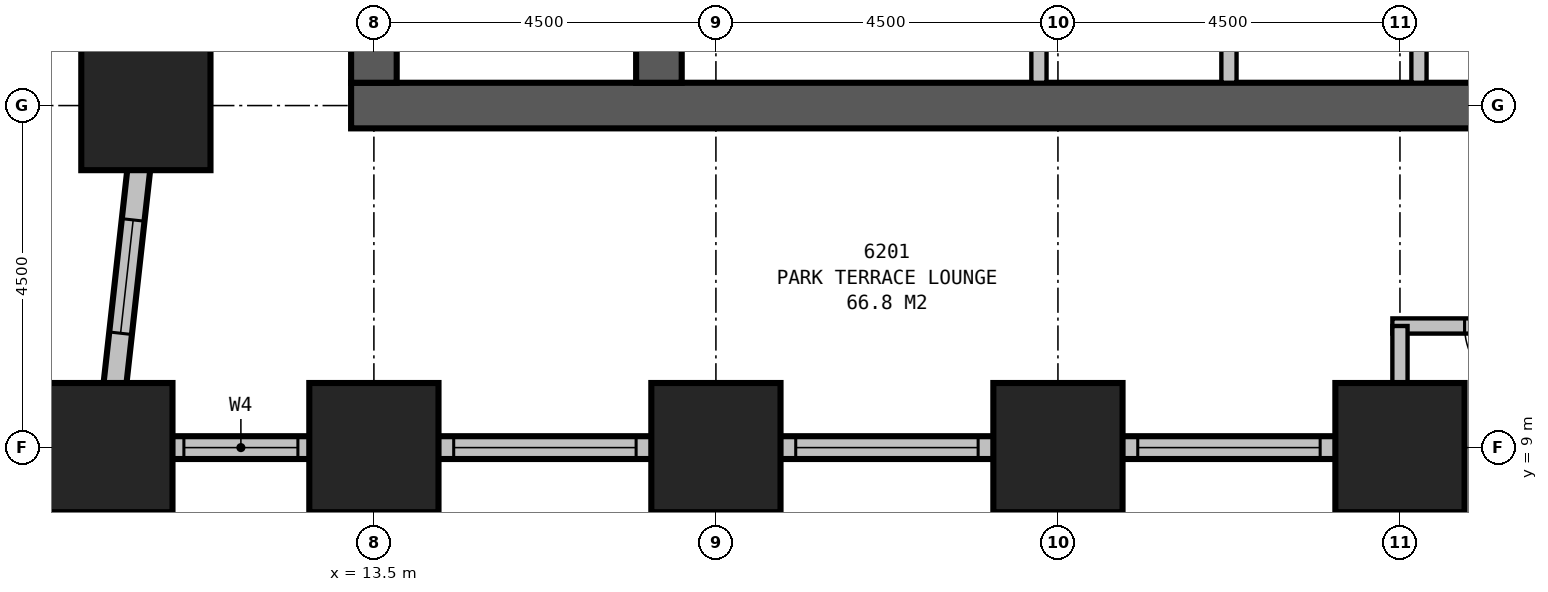
"""IFC4 building model, lengths in metres.
Left out: names, types, materials, properties, quantities, classifications, styles, units other than length and angle.
Written with IfcOpenShell. Run it as: python <this file> out.ifc"""

import sys

from ifc_helpers import new_model, si_unit, direction, frame, frame_2d, origin, origin_2d, place, context, subcontext, project, spatial, rectangle, extrude, element, fill, save


model = new_model("IFC4")
c1 = context("Model", 3, precision=1e-05, world=origin(), true_north=direction((0.0, 1.0)))
c2 = subcontext(c1, "Body", "Model", "MODEL_VIEW")
j1 = project(units=[si_unit("LENGTHUNIT", "METRE"), si_unit("PLANEANGLEUNIT", "RADIAN")], contexts=[c1])
p1 = place(None, origin())
s1 = spatial("IfcSite", under=j1, at=p1, CompositionType="ELEMENT")
p2 = place(p1, origin())
s2 = spatial("IfcBuilding", under=s1, at=p2, CompositionType="ELEMENT")
p3 = place(p2, frame((0.0, 0.0, 240.8)))
s3 = spatial("IfcBuildingStorey", under=s2, at=p3, CompositionType="ELEMENT", Elevation=240.8)
for number, where, z_axis, x_axis in (
    (1, (10.0, 9.0, 0.0), (0.0, 0.0, 1.0), (1.0, 0.0, 0.0)),
    (2, (13.5, 9.0, 0.0), (0.0, 0.0, 1.0), (1.0, 0.0, 0.0)),
    (3, (18.0, 9.0, 0.0), (0.0, 0.0, 1.0), (1.0, 0.0, 0.0)),
    (4, (22.5, 9.0, 0.0), (0.0, 0.0, 1.0), (1.0, 0.0, 0.0)),
    (5, (27.0, 9.0, 0.0), (0.0, 0.0, 1.0), (1.0, 0.0, 0.0)),
    (6, (10.5, 13.5, 0.0), (0.0, 0.0, 1.0), (1.0, 0.0, 0.0)),
):
    element("IfcColumn", number, at=place(p3, frame(where, z_axis=z_axis, x_axis=x_axis)), inside=s3, PredefinedType="COLUMN", context=c2, shape_type="SweptSolid", body=[
        extrude(rectangle(XDim=1.7, YDim=1.7, at=origin_2d()), origin(), (0.0, 0.0, 1.0), 3.9),
    ])
p4 = place(p3, frame((13.2, 13.5, 0.0), z_axis=(0.0, 0.0, 1.0), x_axis=(1.0, 0.0, 0.0)))
e7 = element("IfcWall", 7, at=p4, inside=s3, PredefinedType="SHEAR", context=c2, shape_type="SweptSolid", body=[
    extrude(rectangle(XDim=23.1, YDim=0.6, at=frame_2d((11.55, 0.0))), origin(), (0.0, 0.0, 1.0), 3.9),
])
p5 = place(p3, frame((17.25, 13.8, 0.0), z_axis=(0.0, 0.0, 1.0), x_axis=(0.0, 1.0, 0.0)))
e8 = element("IfcWall", 8, at=p5, inside=s3, PredefinedType="SHEAR", context=c2, shape_type="SweptSolid", body=[
    extrude(rectangle(XDim=12.9, YDim=0.6, at=frame_2d((6.45, 0.0))), origin(), (0.0, 0.0, 1.0), 3.9),
])
p6 = place(p5, frame((3.85, 0.0, 0.0)))
e9 = element("IfcOpeningElement", 9, at=p6, cuts=e8, PredefinedType="OPENING", context=c2, shape_type="SweptSolid", body=[
    extrude(rectangle(XDim=1.2, YDim=2.1, at=frame_2d((0.6, 1.05))), frame((0.0, 0.31, 0.0), z_axis=(0.0, -1.0, 0.0), x_axis=(1.0, 0.0, 0.0)), (0.0, 0.0, 1.0), 0.62),
])
p7 = place(p3, frame((13.5, 16.5, 0.0), z_axis=(0.0, 0.0, 1.0), x_axis=(0.0, -1.0, 0.0)))
e10 = element("IfcWall", 10, at=p7, inside=s3, PredefinedType="SHEAR", context=c2, shape_type="SweptSolid", body=[
    extrude(rectangle(XDim=2.7, YDim=0.6, at=frame_2d((1.35, 0.0))), origin(), (0.0, 0.0, 1.0), 3.9),
])
p8 = place(p3, frame((9.85, 9.0, 0.0), z_axis=(0.0, 0.0, 1.0), x_axis=(1.0, 0.0, 0.0)))
e11 = element("IfcWall", 11, at=p8, inside=s3, PredefinedType="STANDARD", context=c2, shape_type="SweptSolid", body=[
    extrude(rectangle(XDim=17.3, YDim=0.3, at=frame_2d((8.65, 0.0))), origin(), (0.0, 0.0, 1.0), 2.45),
])
p9 = place(p8, frame((1.15, 0.0, 0.5)))
e12 = element("IfcOpeningElement", 12, at=p9, cuts=e11, PredefinedType="OPENING", context=c2, shape_type="SweptSolid", body=[
    extrude(rectangle(XDim=1.5, YDim=1.75, at=frame_2d((0.75, 0.875))), frame((0.0, 0.16, 0.0), z_axis=(0.0, -1.0, 0.0), x_axis=(1.0, 0.0, 0.0)), (0.0, 0.0, 1.0), 0.32),
])
p10 = place(p8, frame((4.7, 0.0, 0.5)))
e13 = element("IfcOpeningElement", 13, at=p10, cuts=e11, PredefinedType="OPENING", context=c2, shape_type="SweptSolid", body=[
    extrude(rectangle(XDim=2.4, YDim=1.75, at=frame_2d((1.2, 0.875))), frame((0.0, 0.16, 0.0), z_axis=(0.0, -1.0, 0.0), x_axis=(1.0, 0.0, 0.0)), (0.0, 0.0, 1.0), 0.32),
])
p11 = place(p8, frame((9.2, 0.0, 0.5)))
e14 = element("IfcOpeningElement", 14, at=p11, cuts=e11, PredefinedType="OPENING", context=c2, shape_type="SweptSolid", body=[
    extrude(rectangle(XDim=2.4, YDim=1.75, at=frame_2d((1.2, 0.875))), frame((0.0, 0.16, 0.0), z_axis=(0.0, -1.0, 0.0), x_axis=(1.0, 0.0, 0.0)), (0.0, 0.0, 1.0), 0.32),
])
p12 = place(p8, frame((13.7, 0.0, 0.5)))
e15 = element("IfcOpeningElement", 15, at=p12, cuts=e11, PredefinedType="OPENING", context=c2, shape_type="SweptSolid", body=[
    extrude(rectangle(XDim=2.4, YDim=1.75, at=frame_2d((1.2, 0.875))), frame((0.0, 0.16, 0.0), z_axis=(0.0, -1.0, 0.0), x_axis=(1.0, 0.0, 0.0)), (0.0, 0.0, 1.0), 0.32),
])
p13 = place(p3, frame((27.0, 9.15, 0.0), z_axis=(0.0, 0.0, 1.0), x_axis=(0.0, -1.0, 0.0)))
e16 = element("IfcWall", 16, at=p13, inside=s3, PredefinedType="STANDARD", context=c2, shape_type="SweptSolid", body=[
    extrude(rectangle(XDim=9.3, YDim=0.3, at=frame_2d((4.65, 0.0))), origin(), (0.0, 0.0, 1.0), 2.45),
])
p14 = place(p13, frame((1.2, 0.0, 0.5)))
e17 = element("IfcOpeningElement", 17, at=p14, cuts=e16, PredefinedType="OPENING", context=c2, shape_type="SweptSolid", body=[
    extrude(rectangle(XDim=2.4, YDim=1.75, at=frame_2d((1.2, 0.875))), frame((0.0, 0.16, 0.0), z_axis=(0.0, -1.0, 0.0), x_axis=(1.0, 0.0, 0.0)), (0.0, 0.0, 1.0), 0.32),
])
p15 = place(p13, frame((5.7, 0.0, 0.5)))
e18 = element("IfcOpeningElement", 18, at=p15, cuts=e16, PredefinedType="OPENING", context=c2, shape_type="SweptSolid", body=[
    extrude(rectangle(XDim=2.4, YDim=1.75, at=frame_2d((1.2, 0.875))), frame((0.0, 0.16, 0.0), z_axis=(0.0, -1.0, 0.0), x_axis=(1.0, 0.0, 0.0)), (0.0, 0.0, 1.0), 0.32),
])
p16 = place(p3, frame((13.517, 40.649, 0.0), z_axis=(0.0, 0.0, 1.0), x_axis=(-0.110433201132, -0.993883548555, 0.0)))
e19 = element("IfcWall", 19, at=p16, inside=s3, PredefinedType="STANDARD", context=c2, shape_type="SweptSolid", body=[
    extrude(rectangle(XDim=31.994, YDim=0.3, at=frame_2d((15.997, 0.0))), origin(), (0.0, 0.0, 1.0), 2.45),
])
p17 = place(p16, frame((1.664, 0.0, 0.5)))
e20 = element("IfcOpeningElement", 20, at=p17, cuts=e19, PredefinedType="OPENING", context=c2, shape_type="SweptSolid", body=[
    extrude(rectangle(XDim=1.5, YDim=1.75, at=frame_2d((0.75, 0.875))), frame((0.0, 0.16, 0.0), z_axis=(0.0, -1.0, 0.0), x_axis=(1.0, 0.0, 0.0)), (0.0, 0.0, 1.0), 0.32),
])
p18 = place(p16, frame((6.192, 0.0, 0.5)))
e21 = element("IfcOpeningElement", 21, at=p18, cuts=e19, PredefinedType="OPENING", context=c2, shape_type="SweptSolid", body=[
    extrude(rectangle(XDim=1.5, YDim=1.75, at=frame_2d((0.75, 0.875))), frame((0.0, 0.16, 0.0), z_axis=(0.0, -1.0, 0.0), x_axis=(1.0, 0.0, 0.0)), (0.0, 0.0, 1.0), 0.32),
])
p19 = place(p16, frame((15.247, 0.0, 0.5)))
e22 = element("IfcOpeningElement", 22, at=p19, cuts=e19, PredefinedType="OPENING", context=c2, shape_type="SweptSolid", body=[
    extrude(rectangle(XDim=1.5, YDim=1.75, at=frame_2d((0.75, 0.875))), frame((0.0, 0.16, 0.0), z_axis=(0.0, -1.0, 0.0), x_axis=(1.0, 0.0, 0.0)), (0.0, 0.0, 1.0), 0.32),
])
p20 = place(p16, frame((19.775, 0.0, 0.5)))
e23 = element("IfcOpeningElement", 23, at=p20, cuts=e19, PredefinedType="OPENING", context=c2, shape_type="SweptSolid", body=[
    extrude(rectangle(XDim=1.5, YDim=1.75, at=frame_2d((0.75, 0.875))), frame((0.0, 0.16, 0.0), z_axis=(0.0, -1.0, 0.0), x_axis=(1.0, 0.0, 0.0)), (0.0, 0.0, 1.0), 0.32),
])
p21 = place(p16, frame((24.302, 0.0, 0.5)))
e24 = element("IfcOpeningElement", 24, at=p21, cuts=e19, PredefinedType="OPENING", context=c2, shape_type="SweptSolid", body=[
    extrude(rectangle(XDim=1.5, YDim=1.75, at=frame_2d((0.75, 0.875))), frame((0.0, 0.16, 0.0), z_axis=(0.0, -1.0, 0.0), x_axis=(1.0, 0.0, 0.0)), (0.0, 0.0, 1.0), 0.32),
])
p22 = place(p16, frame((28.83, 0.0, 0.5)))
e25 = element("IfcOpeningElement", 25, at=p22, cuts=e19, PredefinedType="OPENING", context=c2, shape_type="SweptSolid", body=[
    extrude(rectangle(XDim=1.5, YDim=1.75, at=frame_2d((0.75, 0.875))), frame((0.0, 0.16, 0.0), z_axis=(0.0, -1.0, 0.0), x_axis=(1.0, 0.0, 0.0)), (0.0, 0.0, 1.0), 0.32),
])
p23 = place(p3, frame((26.9, 10.6, 0.0), z_axis=(0.0, 0.0, 1.0), x_axis=(1.0, 0.0, 0.0)))
e26 = element("IfcWall", 26, at=p23, inside=s3, PredefinedType="PARTITIONING", context=c2, shape_type="SweptSolid", body=[
    extrude(rectangle(XDim=11.4, YDim=0.2, at=frame_2d((5.7, 0.0))), origin(), (0.0, 0.0, 1.0), 3.65),
])
p24 = place(p23, frame((1.85, 0.0, 0.0), z_axis=(0.0, 0.0, 1.0), x_axis=(-1.0, 0.0, 0.0)))
e27 = element("IfcOpeningElement", 27, at=p24, cuts=e26, PredefinedType="OPENING", context=c2, shape_type="SweptSolid", body=[
    extrude(rectangle(XDim=0.9, YDim=2.1, at=frame_2d((0.45, 1.05))), frame((0.0, 0.11, 0.0), z_axis=(0.0, -1.0, 0.0), x_axis=(1.0, 0.0, 0.0)), (0.0, 0.0, 1.0), 0.22),
])
p25 = place(p23, frame((10.7, 0.0, 0.0), z_axis=(0.0, 0.0, 1.0), x_axis=(-1.0, 0.0, 0.0)))
e28 = element("IfcOpeningElement", 28, at=p25, cuts=e26, PredefinedType="OPENING", context=c2, shape_type="SweptSolid", body=[
    extrude(rectangle(XDim=0.9, YDim=2.1, at=frame_2d((0.45, 1.05))), frame((0.0, 0.11, 0.0), z_axis=(0.0, -1.0, 0.0), x_axis=(1.0, 0.0, 0.0)), (0.0, 0.0, 1.0), 0.22),
])
p26 = place(p3, frame((27.0, 10.6, 0.0), z_axis=(0.0, 0.0, 1.0), x_axis=(0.0, -1.0, 0.0)))
e29 = element("IfcWall", 29, at=p26, inside=s3, PredefinedType="PARTITIONING", context=c2, shape_type="SweptSolid", body=[
    extrude(rectangle(XDim=1.6, YDim=0.2, at=frame_2d((0.8, 0.0))), origin(), (0.0, 0.0, 1.0), 2.6),
])
for number, where, z_axis, x_axis in (
    (30, (22.25, 13.8, 0.0), (0.0, 0.0, 1.0), (0.0, 1.0, 0.0)),
    (31, (24.75, 13.8, 0.0), (0.0, 0.0, 1.0), (0.0, 1.0, 0.0)),
    (32, (27.25, 13.8, 0.0), (0.0, 0.0, 1.0), (0.0, 1.0, 0.0)),
):
    element("IfcWall", number, at=place(p3, frame(where, z_axis=z_axis, x_axis=x_axis)), inside=s3, PredefinedType="PARTITIONING", context=c2, shape_type="SweptSolid", body=[
        extrude(rectangle(XDim=2.4, YDim=0.2, at=frame_2d((1.2, 0.0))), origin(), (0.0, 0.0, 1.0), 3.65),
    ])
p27 = place(p9, origin())
e33 = element("IfcWindow", 33, at=p27, inside=s3, PartitioningType="SINGLE_PANEL", PredefinedType="WINDOW", context=c2, shape_type="SweptSolid", body=[
    extrude(rectangle(XDim=1.5, YDim=1.75, at=frame_2d((0.75, 0.875))), frame((0.0, 0.03, 0.0), z_axis=(0.0, -1.0, 0.0), x_axis=(1.0, 0.0, 0.0)), (0.0, 0.0, 1.0), 0.06),
])
fill(e12, e33)
p28 = place(p10, origin())
e34 = element("IfcWindow", 34, at=p28, inside=s3, PartitioningType="SINGLE_PANEL", PredefinedType="WINDOW", context=c2, shape_type="SweptSolid", body=[
    extrude(rectangle(XDim=2.4, YDim=1.75, at=frame_2d((1.2, 0.875))), frame((0.0, 0.03, 0.0), z_axis=(0.0, -1.0, 0.0), x_axis=(1.0, 0.0, 0.0)), (0.0, 0.0, 1.0), 0.06),
])
fill(e13, e34)
p29 = place(p11, origin())
e35 = element("IfcWindow", 35, at=p29, inside=s3, PartitioningType="SINGLE_PANEL", PredefinedType="WINDOW", context=c2, shape_type="SweptSolid", body=[
    extrude(rectangle(XDim=2.4, YDim=1.75, at=frame_2d((1.2, 0.875))), frame((0.0, 0.03, 0.0), z_axis=(0.0, -1.0, 0.0), x_axis=(1.0, 0.0, 0.0)), (0.0, 0.0, 1.0), 0.06),
])
fill(e14, e35)
p30 = place(p12, origin())
e36 = element("IfcWindow", 36, at=p30, inside=s3, PartitioningType="SINGLE_PANEL", PredefinedType="WINDOW", context=c2, shape_type="SweptSolid", body=[
    extrude(rectangle(XDim=2.4, YDim=1.75, at=frame_2d((1.2, 0.875))), frame((0.0, 0.03, 0.0), z_axis=(0.0, -1.0, 0.0), x_axis=(1.0, 0.0, 0.0)), (0.0, 0.0, 1.0), 0.06),
])
fill(e15, e36)
p31 = place(p22, origin())
e37 = element("IfcWindow", 37, at=p31, inside=s3, PartitioningType="SINGLE_PANEL", PredefinedType="WINDOW", context=c2, shape_type="SweptSolid", body=[
    extrude(rectangle(XDim=1.5, YDim=1.75, at=frame_2d((0.75, 0.875))), frame((0.0, 0.03, 0.0), z_axis=(0.0, -1.0, 0.0), x_axis=(1.0, 0.0, 0.0)), (0.0, 0.0, 1.0), 0.06),
])
fill(e25, e37)
p32 = place(p24, origin())
e38 = element("IfcDoor", 38, at=p32, inside=s3, OperationType="SINGLE_SWING_LEFT", PredefinedType="DOOR", context=c2, shape_type="SweptSolid", body=[
    extrude(rectangle(XDim=0.9, YDim=2.1, at=frame_2d((0.45, 1.05))), frame((0.0, 0.025, 0.0), z_axis=(0.0, -1.0, 0.0), x_axis=(1.0, 0.0, 0.0)), (0.0, 0.0, 1.0), 0.05),
])
fill(e27, e38)
save(model, sys.argv[1])
